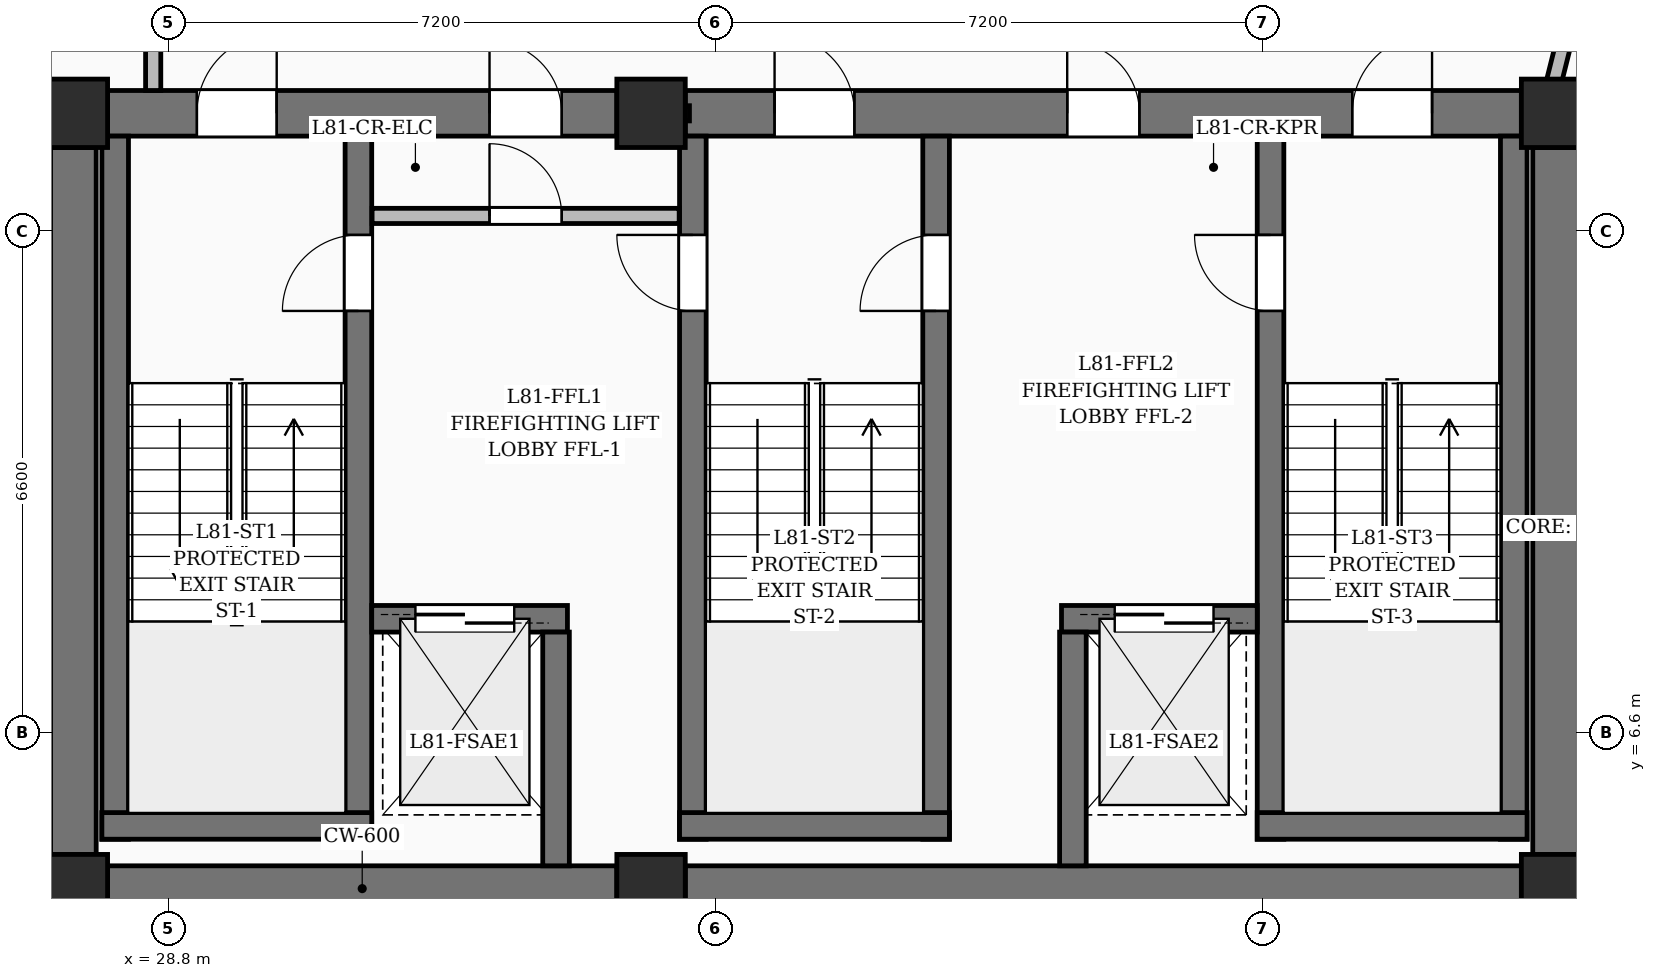
"""IFC4 building model, lengths in metres.
Left out: names, types, materials, properties, quantities, classifications, styles, units other than length and angle.
Written with IfcOpenShell. Run it as: python <this file> out.ifc"""

import sys

from ifc_helpers import new_model, si_unit, direction, frame, frame_2d, origin, origin_2d, place, context, subcontext, project, spatial, rectangle, extrude, element, fill, save


model = new_model("IFC4")
c1 = context("Model", 3, precision=1e-05, world=origin(), true_north=direction((0.0, 1.0)))
c2 = subcontext(c1, "Body", "Model", "MODEL_VIEW")
j1 = project(units=[si_unit("LENGTHUNIT", "METRE"), si_unit("PLANEANGLEUNIT", "RADIAN")], contexts=[c1])
p1 = place(None, origin())
s1 = spatial("IfcSite", under=j1, at=p1, CompositionType="ELEMENT")
p2 = place(p1, origin())
s2 = spatial("IfcBuilding", under=s1, at=p2, CompositionType="ELEMENT")
p3 = place(p2, frame((0.0, 0.0, 314.5)))
s3 = spatial("IfcBuildingStorey", under=s2, at=p3, CompositionType="ELEMENT", Elevation=314.5)
for number, where, z_axis, x_axis in (
    (1, (27.55, 4.55, 0.0), (0.0, 0.0, 1.0), (1.0, 0.0, 0.0)),
    (2, (35.15, 4.55, 0.0), (0.0, 0.0, 1.0), (1.0, 0.0, 0.0)),
    (3, (47.05, 4.55, 0.0), (0.0, 0.0, 1.0), (1.0, 0.0, 0.0)),
    (4, (27.55, 14.75, 0.0), (0.0, 0.0, 1.0), (1.0, 0.0, 0.0)),
    (5, (35.15, 14.75, 0.0), (0.0, 0.0, 1.0), (1.0, 0.0, 0.0)),
    (6, (47.05, 14.75, 0.0), (0.0, 0.0, 1.0), (1.0, 0.0, 0.0)),
):
    element("IfcColumn", number, at=place(p3, frame(where, z_axis=z_axis, x_axis=x_axis)), inside=s3, PredefinedType="COLUMN", context=c2, shape_type="SweptSolid", body=[
        extrude(rectangle(XDim=0.9, YDim=0.9, at=origin_2d()), origin(), (0.0, 0.0, 1.0), 4.0),
    ])
p4 = place(p3, frame((28.0, 4.55, 0.0), z_axis=(0.0, 0.0, 1.0), x_axis=(1.0, 0.0, 0.0)))
e7 = element("IfcWall", 7, at=p4, inside=s3, PredefinedType="SHEAR", context=c2, shape_type="SweptSolid", body=[
    extrude(rectangle(XDim=6.7, YDim=0.6, at=frame_2d((3.35, 0.0))), origin(), (0.0, 0.0, 1.0), 4.0),
])
p5 = place(p3, frame((35.6, 4.55, 0.0), z_axis=(0.0, 0.0, 1.0), x_axis=(1.0, 0.0, 0.0)))
e8 = element("IfcWall", 8, at=p5, inside=s3, PredefinedType="SHEAR", context=c2, shape_type="SweptSolid", body=[
    extrude(rectangle(XDim=11.0, YDim=0.6, at=frame_2d((5.5, 0.0))), origin(), (0.0, 0.0, 1.0), 4.0),
])
p6 = place(p3, frame((28.0, 14.75, 0.0), z_axis=(0.0, 0.0, 1.0), x_axis=(1.0, 0.0, 0.0)))
e9 = element("IfcWall", 9, at=p6, inside=s3, PredefinedType="SHEAR", context=c2, shape_type="SweptSolid", body=[
    extrude(rectangle(XDim=6.7, YDim=0.6, at=frame_2d((3.35, 0.0))), origin(), (0.0, 0.0, 1.0), 4.0),
])
p7 = place(p6, frame((1.175, 0.0, 0.0)))
e10 = element("IfcOpeningElement", 10, at=p7, cuts=e9, PredefinedType="OPENING", context=c2, shape_type="SweptSolid", body=[
    extrude(rectangle(XDim=1.05, YDim=2.15, at=frame_2d((0.525, 1.075))), frame((0.0, 0.31, 0.0), z_axis=(0.0, -1.0, 0.0), x_axis=(1.0, 0.0, 0.0)), (0.0, 0.0, 1.0), 0.62),
])
p8 = place(p6, frame((5.025, 0.0, 0.0)))
e11 = element("IfcOpeningElement", 11, at=p8, cuts=e9, PredefinedType="OPENING", context=c2, shape_type="SweptSolid", body=[
    extrude(rectangle(XDim=0.95, YDim=2.15, at=frame_2d((0.475, 1.075))), frame((0.0, 0.31, 0.0), z_axis=(0.0, -1.0, 0.0), x_axis=(1.0, 0.0, 0.0)), (0.0, 0.0, 1.0), 0.62),
])
p9 = place(p3, frame((35.6, 14.75, 0.0), z_axis=(0.0, 0.0, 1.0), x_axis=(1.0, 0.0, 0.0)))
e12 = element("IfcWall", 12, at=p9, inside=s3, PredefinedType="SHEAR", context=c2, shape_type="SweptSolid", body=[
    extrude(rectangle(XDim=11.0, YDim=0.6, at=frame_2d((5.5, 0.0))), origin(), (0.0, 0.0, 1.0), 4.0),
])
p10 = place(p9, frame((1.175, 0.0, 0.0)))
e13 = element("IfcOpeningElement", 13, at=p10, cuts=e12, PredefinedType="OPENING", context=c2, shape_type="SweptSolid", body=[
    extrude(rectangle(XDim=1.05, YDim=2.15, at=frame_2d((0.525, 1.075))), frame((0.0, 0.31, 0.0), z_axis=(0.0, -1.0, 0.0), x_axis=(1.0, 0.0, 0.0)), (0.0, 0.0, 1.0), 0.62),
])
p11 = place(p9, frame((8.775, 0.0, 0.0)))
e14 = element("IfcOpeningElement", 14, at=p11, cuts=e12, PredefinedType="OPENING", context=c2, shape_type="SweptSolid", body=[
    extrude(rectangle(XDim=1.05, YDim=2.15, at=frame_2d((0.525, 1.075))), frame((0.0, 0.31, 0.0), z_axis=(0.0, -1.0, 0.0), x_axis=(1.0, 0.0, 0.0)), (0.0, 0.0, 1.0), 0.62),
])
p12 = place(p9, frame((5.025, 0.0, 0.0)))
e15 = element("IfcOpeningElement", 15, at=p12, cuts=e12, PredefinedType="OPENING", context=c2, shape_type="SweptSolid", body=[
    extrude(rectangle(XDim=0.95, YDim=2.15, at=frame_2d((0.475, 1.075))), frame((0.0, 0.31, 0.0), z_axis=(0.0, -1.0, 0.0), x_axis=(1.0, 0.0, 0.0)), (0.0, 0.0, 1.0), 0.62),
])
for number, where, z_axis, x_axis in (
    (16, (27.55, 5.0, 0.0), (0.0, 0.0, 1.0), (0.0, 1.0, 0.0)),
    (17, (47.05, 5.0, 0.0), (0.0, 0.0, 1.0), (0.0, 1.0, 0.0)),
):
    element("IfcWall", number, at=place(p3, frame(where, z_axis=z_axis, x_axis=x_axis)), inside=s3, PredefinedType="SHEAR", context=c2, shape_type="SweptSolid", body=[
        extrude(rectangle(XDim=9.3, YDim=0.6, at=frame_2d((4.65, 0.0))), origin(), (0.0, 0.0, 1.0), 4.0),
    ])
p13 = place(p3, frame((28.1, 5.2, 0.0), z_axis=(0.0, 0.0, 1.0), x_axis=(0.0, 1.0, 0.0)))
e18 = element("IfcWall", 18, at=p13, inside=s3, PredefinedType="SOLIDWALL", context=c2, shape_type="SweptSolid", body=[
    extrude(rectangle(XDim=9.25, YDim=0.35, at=frame_2d((4.625, 0.0))), origin(), (0.0, 0.0, 1.0), 4.0),
])
p14 = place(p3, frame((31.3, 5.2, 0.0), z_axis=(0.0, 0.0, 1.0), x_axis=(0.0, 1.0, 0.0)))
e19 = element("IfcWall", 19, at=p14, inside=s3, PredefinedType="SOLIDWALL", context=c2, shape_type="SweptSolid", body=[
    extrude(rectangle(XDim=9.25, YDim=0.35, at=frame_2d((4.625, 0.0))), origin(), (0.0, 0.0, 1.0), 4.0),
])
p15 = place(p14, frame((6.95, 0.0, 0.0)))
e20 = element("IfcOpeningElement", 20, at=p15, cuts=e19, PredefinedType="OPENING", context=c2, shape_type="SweptSolid", body=[
    extrude(rectangle(XDim=1.0, YDim=2.15, at=frame_2d((0.5, 1.075))), frame((0.0, 0.185, 0.0), z_axis=(0.0, -1.0, 0.0), x_axis=(1.0, 0.0, 0.0)), (0.0, 0.0, 1.0), 0.37),
])
p16 = place(p3, frame((27.925, 5.375, 0.0), z_axis=(0.0, 0.0, 1.0), x_axis=(1.0, 0.0, 0.0)))
e21 = element("IfcWall", 21, at=p16, inside=s3, PredefinedType="SOLIDWALL", context=c2, shape_type="SweptSolid", body=[
    extrude(rectangle(XDim=3.55, YDim=0.35, at=frame_2d((1.775, 0.0))), origin(), (0.0, 0.0, 1.0), 4.0),
])
p17 = place(p3, frame((35.7, 5.2, 0.0), z_axis=(0.0, 0.0, 1.0), x_axis=(0.0, 1.0, 0.0)))
e22 = element("IfcWall", 22, at=p17, inside=s3, PredefinedType="SOLIDWALL", context=c2, shape_type="SweptSolid", body=[
    extrude(rectangle(XDim=9.25, YDim=0.35, at=frame_2d((4.625, 0.0))), origin(), (0.0, 0.0, 1.0), 4.0),
])
p18 = place(p17, frame((6.95, 0.0, 0.0)))
e23 = element("IfcOpeningElement", 23, at=p18, cuts=e22, PredefinedType="OPENING", context=c2, shape_type="SweptSolid", body=[
    extrude(rectangle(XDim=1.0, YDim=2.15, at=frame_2d((0.5, 1.075))), frame((0.0, 0.185, 0.0), z_axis=(0.0, -1.0, 0.0), x_axis=(1.0, 0.0, 0.0)), (0.0, 0.0, 1.0), 0.37),
])
p19 = place(p3, frame((38.9, 5.2, 0.0), z_axis=(0.0, 0.0, 1.0), x_axis=(0.0, 1.0, 0.0)))
e24 = element("IfcWall", 24, at=p19, inside=s3, PredefinedType="SOLIDWALL", context=c2, shape_type="SweptSolid", body=[
    extrude(rectangle(XDim=9.25, YDim=0.35, at=frame_2d((4.625, 0.0))), origin(), (0.0, 0.0, 1.0), 4.0),
])
p20 = place(p19, frame((6.95, 0.0, 0.0)))
e25 = element("IfcOpeningElement", 25, at=p20, cuts=e24, PredefinedType="OPENING", context=c2, shape_type="SweptSolid", body=[
    extrude(rectangle(XDim=1.0, YDim=2.15, at=frame_2d((0.5, 1.075))), frame((0.0, 0.185, 0.0), z_axis=(0.0, -1.0, 0.0), x_axis=(1.0, 0.0, 0.0)), (0.0, 0.0, 1.0), 0.37),
])
p21 = place(p3, frame((35.525, 5.375, 0.0), z_axis=(0.0, 0.0, 1.0), x_axis=(1.0, 0.0, 0.0)))
e26 = element("IfcWall", 26, at=p21, inside=s3, PredefinedType="SOLIDWALL", context=c2, shape_type="SweptSolid", body=[
    extrude(rectangle(XDim=3.55, YDim=0.35, at=frame_2d((1.775, 0.0))), origin(), (0.0, 0.0, 1.0), 4.0),
])
p22 = place(p3, frame((43.3, 5.2, 0.0), z_axis=(0.0, 0.0, 1.0), x_axis=(0.0, 1.0, 0.0)))
e27 = element("IfcWall", 27, at=p22, inside=s3, PredefinedType="SOLIDWALL", context=c2, shape_type="SweptSolid", body=[
    extrude(rectangle(XDim=9.25, YDim=0.35, at=frame_2d((4.625, 0.0))), origin(), (0.0, 0.0, 1.0), 4.0),
])
p23 = place(p22, frame((6.95, 0.0, 0.0)))
e28 = element("IfcOpeningElement", 28, at=p23, cuts=e27, PredefinedType="OPENING", context=c2, shape_type="SweptSolid", body=[
    extrude(rectangle(XDim=1.0, YDim=2.15, at=frame_2d((0.5, 1.075))), frame((0.0, 0.185, 0.0), z_axis=(0.0, -1.0, 0.0), x_axis=(1.0, 0.0, 0.0)), (0.0, 0.0, 1.0), 0.37),
])
p24 = place(p3, frame((46.5, 5.2, 0.0), z_axis=(0.0, 0.0, 1.0), x_axis=(0.0, 1.0, 0.0)))
e29 = element("IfcWall", 29, at=p24, inside=s3, PredefinedType="SOLIDWALL", context=c2, shape_type="SweptSolid", body=[
    extrude(rectangle(XDim=9.25, YDim=0.35, at=frame_2d((4.625, 0.0))), origin(), (0.0, 0.0, 1.0), 4.0),
])
p25 = place(p3, frame((43.125, 5.375, 0.0), z_axis=(0.0, 0.0, 1.0), x_axis=(1.0, 0.0, 0.0)))
e30 = element("IfcWall", 30, at=p25, inside=s3, PredefinedType="SOLIDWALL", context=c2, shape_type="SweptSolid", body=[
    extrude(rectangle(XDim=3.55, YDim=0.35, at=frame_2d((1.775, 0.0))), origin(), (0.0, 0.0, 1.0), 4.0),
])
p26 = place(p3, frame((31.475, 8.1, 0.0), z_axis=(0.0, 0.0, 1.0), x_axis=(1.0, 0.0, 0.0)))
e31 = element("IfcWall", 31, at=p26, inside=s3, PredefinedType="SOLIDWALL", context=c2, shape_type="SweptSolid", body=[
    extrude(rectangle(XDim=2.575, YDim=0.35, at=frame_2d((1.288, 0.0))), origin(), (0.0, 0.0, 1.0), 4.0),
])
p27 = place(p26, frame((0.575, 0.0, 0.0)))
e32 = element("IfcOpeningElement", 32, at=p27, cuts=e31, PredefinedType="OPENING", context=c2, shape_type="SweptSolid", body=[
    extrude(rectangle(XDim=1.3, YDim=2.25, at=frame_2d((0.65, 1.125))), frame((0.0, 0.185, 0.0), z_axis=(0.0, -1.0, 0.0), x_axis=(1.0, 0.0, 0.0)), (0.0, 0.0, 1.0), 0.37),
])
p28 = place(p3, frame((40.55, 8.1, 0.0), z_axis=(0.0, 0.0, 1.0), x_axis=(1.0, 0.0, 0.0)))
e33 = element("IfcWall", 33, at=p28, inside=s3, PredefinedType="SOLIDWALL", context=c2, shape_type="SweptSolid", body=[
    extrude(rectangle(XDim=2.575, YDim=0.35, at=frame_2d((1.288, 0.0))), origin(), (0.0, 0.0, 1.0), 4.0),
])
p29 = place(p28, frame((0.7, 0.0, 0.0)))
e34 = element("IfcOpeningElement", 34, at=p29, cuts=e33, PredefinedType="OPENING", context=c2, shape_type="SweptSolid", body=[
    extrude(rectangle(XDim=1.3, YDim=2.25, at=frame_2d((0.65, 1.125))), frame((0.0, 0.185, 0.0), z_axis=(0.0, -1.0, 0.0), x_axis=(1.0, 0.0, 0.0)), (0.0, 0.0, 1.0), 0.37),
])
for number, where, z_axis, x_axis in (
    (35, (33.9, 4.85, 0.0), (0.0, 0.0, 1.0), (0.0, 1.0, 0.0)),
    (36, (40.7, 4.85, 0.0), (0.0, 0.0, 1.0), (0.0, 1.0, 0.0)),
):
    element("IfcWall", number, at=place(p3, frame(where, z_axis=z_axis, x_axis=x_axis)), inside=s3, PredefinedType="SOLIDWALL", context=c2, shape_type="SweptSolid", body=[
        extrude(rectangle(XDim=3.075, YDim=0.35, at=frame_2d((1.538, 0.0))), origin(), (0.0, 0.0, 1.0), 4.0),
    ])
p30 = place(p3, frame((34.72, 14.75, 0.0), z_axis=(0.0, 0.0, 1.0), x_axis=(1.0, 0.0, 0.0)))
e37 = element("IfcWall", 37, at=p30, inside=s3, PredefinedType="PARTITIONING", context=c2, shape_type="SweptSolid", body=[
    extrude(rectangle(XDim=0.935, YDim=0.2, at=frame_2d((0.468, 0.0))), origin(), (0.0, 0.0, 1.0), 2.885),
])
p31 = place(p3, frame((31.48, 13.4, 0.0), z_axis=(0.0, 0.0, 1.0), x_axis=(1.0, 0.0, 0.0)))
e38 = element("IfcWall", 38, at=p31, inside=s3, PredefinedType="PARTITIONING", context=c2, shape_type="SweptSolid", body=[
    extrude(rectangle(XDim=4.04, YDim=0.2, at=frame_2d((2.02, 0.0))), origin(), (0.0, 0.0, 1.0), 3.7),
])
p32 = place(p31, frame((1.545, 0.0, 0.0)))
e39 = element("IfcOpeningElement", 39, at=p32, cuts=e38, PredefinedType="OPENING", context=c2, shape_type="SweptSolid", body=[
    extrude(rectangle(XDim=0.95, YDim=2.15, at=frame_2d((0.475, 1.075))), frame((0.0, 0.11, 0.0), z_axis=(0.0, -1.0, 0.0), x_axis=(1.0, 0.0, 0.0)), (0.0, 0.0, 1.0), 0.22),
])
p33 = place(p3, frame((28.6, 17.4, 0.0), z_axis=(0.0, 0.0, 1.0), x_axis=(0.0, -1.0, 0.0)))
e40 = element("IfcWall", 40, at=p33, inside=s3, PredefinedType="PARTITIONING", context=c2, shape_type="SweptSolid", body=[
    extrude(rectangle(XDim=2.35, YDim=0.2, at=frame_2d((1.175, 0.0))), origin(), (0.0, 0.0, 1.0), 3.7),
])
p34 = place(p3, frame((47.0, 15.05, 0.0), z_axis=(0.0, 0.0, 1.0), x_axis=(0.242801110844, 0.970076090094, 0.0)))
e41 = element("IfcWall", 41, at=p34, inside=s3, PredefinedType="PARTITIONING", context=c2, shape_type="SweptSolid", body=[
    extrude(rectangle(XDim=2.38, YDim=0.2, at=frame_2d((1.19, 0.0))), origin(), (0.0, 0.0, 1.0), 3.035),
])
p35 = place(p7, origin())
e42 = element("IfcDoor", 42, at=p35, inside=s3, OperationType="SINGLE_SWING_RIGHT", PredefinedType="DOOR", context=c2, shape_type="SweptSolid", body=[
    extrude(rectangle(XDim=1.05, YDim=2.15, at=frame_2d((0.525, 1.075))), frame((0.0, 0.025, 0.0), z_axis=(0.0, -1.0, 0.0), x_axis=(1.0, 0.0, 0.0)), (0.0, 0.0, 1.0), 0.05),
])
fill(e10, e42)
p36 = place(p10, origin())
e43 = element("IfcDoor", 43, at=p36, inside=s3, OperationType="SINGLE_SWING_LEFT", PredefinedType="DOOR", context=c2, shape_type="SweptSolid", body=[
    extrude(rectangle(XDim=1.05, YDim=2.15, at=frame_2d((0.525, 1.075))), frame((0.0, 0.025, 0.0), z_axis=(0.0, -1.0, 0.0), x_axis=(1.0, 0.0, 0.0)), (0.0, 0.0, 1.0), 0.05),
])
fill(e13, e43)
p37 = place(p11, origin())
e44 = element("IfcDoor", 44, at=p37, inside=s3, OperationType="SINGLE_SWING_RIGHT", PredefinedType="DOOR", context=c2, shape_type="SweptSolid", body=[
    extrude(rectangle(XDim=1.05, YDim=2.15, at=frame_2d((0.525, 1.075))), frame((0.0, 0.025, 0.0), z_axis=(0.0, -1.0, 0.0), x_axis=(1.0, 0.0, 0.0)), (0.0, 0.0, 1.0), 0.05),
])
fill(e14, e44)
p38 = place(p15, origin())
e45 = element("IfcDoor", 45, at=p38, inside=s3, OperationType="SINGLE_SWING_LEFT", PredefinedType="DOOR", context=c2, shape_type="SweptSolid", body=[
    extrude(rectangle(XDim=1.0, YDim=2.15, at=frame_2d((0.5, 1.075))), frame((0.0, 0.025, 0.0), z_axis=(0.0, -1.0, 0.0), x_axis=(1.0, 0.0, 0.0)), (0.0, 0.0, 1.0), 0.05),
])
fill(e20, e45)
p39 = place(p18, origin())
e46 = element("IfcDoor", 46, at=p39, inside=s3, OperationType="SINGLE_SWING_RIGHT", PredefinedType="DOOR", context=c2, shape_type="SweptSolid", body=[
    extrude(rectangle(XDim=1.0, YDim=2.15, at=frame_2d((0.5, 1.075))), frame((0.0, 0.025, 0.0), z_axis=(0.0, -1.0, 0.0), x_axis=(1.0, 0.0, 0.0)), (0.0, 0.0, 1.0), 0.05),
])
fill(e23, e46)
p40 = place(p20, origin())
e47 = element("IfcDoor", 47, at=p40, inside=s3, OperationType="SINGLE_SWING_LEFT", PredefinedType="DOOR", context=c2, shape_type="SweptSolid", body=[
    extrude(rectangle(XDim=1.0, YDim=2.15, at=frame_2d((0.5, 1.075))), frame((0.0, 0.025, 0.0), z_axis=(0.0, -1.0, 0.0), x_axis=(1.0, 0.0, 0.0)), (0.0, 0.0, 1.0), 0.05),
])
fill(e25, e47)
p41 = place(p23, origin())
e48 = element("IfcDoor", 48, at=p41, inside=s3, OperationType="SINGLE_SWING_RIGHT", PredefinedType="DOOR", context=c2, shape_type="SweptSolid", body=[
    extrude(rectangle(XDim=1.0, YDim=2.15, at=frame_2d((0.5, 1.075))), frame((0.0, 0.025, 0.0), z_axis=(0.0, -1.0, 0.0), x_axis=(1.0, 0.0, 0.0)), (0.0, 0.0, 1.0), 0.05),
])
fill(e28, e48)
p42 = place(p27, origin())
e49 = element("IfcDoor", 49, at=p42, inside=s3, OperationType="DOUBLE_DOOR_SLIDING", PredefinedType="DOOR", context=c2, shape_type="SweptSolid", body=[
    extrude(rectangle(XDim=1.3, YDim=2.25, at=frame_2d((0.65, 1.125))), frame((0.0, 0.025, 0.0), z_axis=(0.0, -1.0, 0.0), x_axis=(1.0, 0.0, 0.0)), (0.0, 0.0, 1.0), 0.05),
])
fill(e32, e49)
p43 = place(p29, origin())
e50 = element("IfcDoor", 50, at=p43, inside=s3, OperationType="DOUBLE_DOOR_SLIDING", PredefinedType="DOOR", context=c2, shape_type="SweptSolid", body=[
    extrude(rectangle(XDim=1.3, YDim=2.25, at=frame_2d((0.65, 1.125))), frame((0.0, 0.025, 0.0), z_axis=(0.0, -1.0, 0.0), x_axis=(1.0, 0.0, 0.0)), (0.0, 0.0, 1.0), 0.05),
])
fill(e34, e50)
p44 = place(p32, origin())
e51 = element("IfcDoor", 51, at=p44, inside=s3, OperationType="SINGLE_SWING_LEFT", PredefinedType="DOOR", context=c2, shape_type="SweptSolid", body=[
    extrude(rectangle(XDim=0.95, YDim=2.15, at=frame_2d((0.475, 1.075))), frame((0.0, 0.025, 0.0), z_axis=(0.0, -1.0, 0.0), x_axis=(1.0, 0.0, 0.0)), (0.0, 0.0, 1.0), 0.05),
])
fill(e39, e51)
p45 = place(p8, origin())
e52 = element("IfcDoor", 52, at=p45, inside=s3, OperationType="SINGLE_SWING_LEFT", PredefinedType="DOOR", context=c2, shape_type="SweptSolid", body=[
    extrude(rectangle(XDim=0.95, YDim=2.15, at=frame_2d((0.475, 1.075))), frame((0.0, 0.025, 0.0), z_axis=(0.0, -1.0, 0.0), x_axis=(1.0, 0.0, 0.0)), (0.0, 0.0, 1.0), 0.05),
])
fill(e11, e52)
p46 = place(p12, origin())
e53 = element("IfcDoor", 53, at=p46, inside=s3, OperationType="SINGLE_SWING_LEFT", PredefinedType="DOOR", context=c2, shape_type="SweptSolid", body=[
    extrude(rectangle(XDim=0.95, YDim=2.15, at=frame_2d((0.475, 1.075))), frame((0.0, 0.025, 0.0), z_axis=(0.0, -1.0, 0.0), x_axis=(1.0, 0.0, 0.0)), (0.0, 0.0, 1.0), 0.05),
])
fill(e15, e53)
save(model, sys.argv[1])
